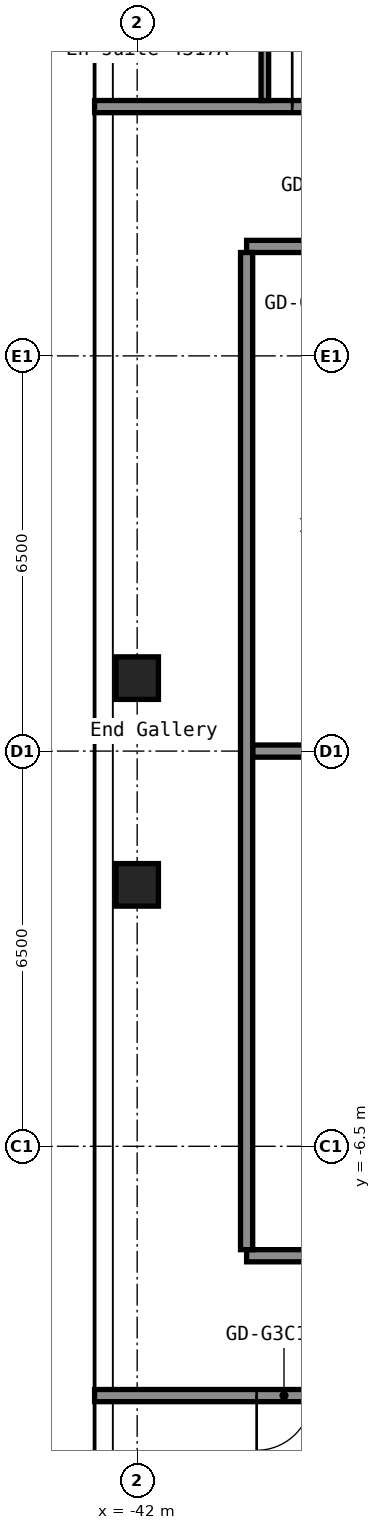
"""IFC4 building model, lengths in metres.
Left out: names, types, materials, properties, quantities, classifications, styles, units other than length and angle.
Written with IfcOpenShell. Run it as: python <this file> out.ifc"""

import sys

from ifc_helpers import new_model, si_unit, direction, frame, frame_2d, origin, origin_2d, place, context, subcontext, project, spatial, rectangle, hollow_rectangle, extrude, element, fill, save


model = new_model("IFC4")
c1 = context("Model", 3, precision=1e-05, world=origin(), true_north=direction((0.0, 1.0)))
c2 = subcontext(c1, "Body", "Model", "MODEL_VIEW")
j1 = project(units=[si_unit("LENGTHUNIT", "METRE"), si_unit("PLANEANGLEUNIT", "RADIAN")], contexts=[c1])
p1 = place(None, origin())
s1 = spatial("IfcSite", under=j1, at=p1, CompositionType="ELEMENT")
p2 = place(p1, origin())
s2 = spatial("IfcBuilding", under=s1, at=p2, CompositionType="ELEMENT")
p3 = place(p2, frame((0.0, 0.0, 153.4)))
s3 = spatial("IfcBuildingStorey", under=s2, at=p3, CompositionType="ELEMENT", Elevation=153.4)
for number, where, z_axis, x_axis in (
    (1, (-42.0, -2.2, 0.0), (0.0, 0.0, 1.0), (1.0, 0.0, 0.0)),
    (2, (-42.0, 1.2, 0.0), (0.0, 0.0, 1.0), (1.0, 0.0, 0.0)),
):
    element("IfcColumn", number, at=place(p3, frame(where, z_axis=z_axis, x_axis=x_axis)), inside=s3, PredefinedType="COLUMN", context=c2, shape_type="SweptSolid", body=[
        extrude(hollow_rectangle(XDim=0.7, YDim=0.7, WallThickness=0.028, at=origin_2d()), origin(), (0.0, 0.0, 1.0), 2.75),
    ])
p4 = place(p3, frame((-42.7, -10.6, 0.0), z_axis=(0.0, 0.0, 1.0), x_axis=(1.0, 0.0, 0.0)))
e3 = element("IfcWall", 3, at=p4, inside=s3, PredefinedType="PARTITIONING", context=c2, shape_type="SweptSolid", body=[
    extrude(rectangle(XDim=25.9, YDim=0.2, at=frame_2d((12.95, 0.0))), origin(), (0.0, 0.0, 1.0), 2.75),
])
p5 = place(p4, frame((2.665, 0.0, 0.0)))
e4 = element("IfcOpeningElement", 4, at=p5, cuts=e3, PredefinedType="OPENING", context=c2, shape_type="SweptSolid", body=[
    extrude(rectangle(XDim=0.9, YDim=2.1, at=frame_2d((0.45, 1.05))), frame((0.0, 0.11, 0.0), z_axis=(0.0, -1.0, 0.0), x_axis=(1.0, 0.0, 0.0)), (0.0, 0.0, 1.0), 0.22),
])
p6 = place(p4, frame((7.065, 0.0, 0.0)))
e5 = element("IfcOpeningElement", 5, at=p6, cuts=e3, PredefinedType="OPENING", context=c2, shape_type="SweptSolid", body=[
    extrude(rectangle(XDim=0.9, YDim=2.1, at=frame_2d((0.45, 1.05))), frame((0.0, 0.11, 0.0), z_axis=(0.0, -1.0, 0.0), x_axis=(1.0, 0.0, 0.0)), (0.0, 0.0, 1.0), 0.22),
])
p7 = place(p4, frame((11.255, 0.0, 0.0)))
e6 = element("IfcOpeningElement", 6, at=p7, cuts=e3, PredefinedType="OPENING", context=c2, shape_type="SweptSolid", body=[
    extrude(rectangle(XDim=0.9, YDim=2.1, at=frame_2d((0.45, 1.05))), frame((0.0, 0.11, 0.0), z_axis=(0.0, -1.0, 0.0), x_axis=(1.0, 0.0, 0.0)), (0.0, 0.0, 1.0), 0.22),
])
p8 = place(p4, frame((15.455, 0.0, 0.0)))
e7 = element("IfcOpeningElement", 7, at=p8, cuts=e3, PredefinedType="OPENING", context=c2, shape_type="SweptSolid", body=[
    extrude(rectangle(XDim=0.9, YDim=2.1, at=frame_2d((0.45, 1.05))), frame((0.0, 0.11, 0.0), z_axis=(0.0, -1.0, 0.0), x_axis=(1.0, 0.0, 0.0)), (0.0, 0.0, 1.0), 0.22),
])
p9 = place(p4, frame((21.2, 0.0, 0.0)))
e8 = element("IfcOpeningElement", 8, at=p9, cuts=e3, PredefinedType="OPENING", context=c2, shape_type="SweptSolid", body=[
    extrude(rectangle(XDim=1.0, YDim=2.1, at=frame_2d((0.5, 1.05))), frame((0.0, 0.11, 0.0), z_axis=(0.0, -1.0, 0.0), x_axis=(1.0, 0.0, 0.0)), (0.0, 0.0, 1.0), 0.22),
])
p10 = place(p3, frame((-40.2, -8.3, 0.0), z_axis=(0.0, 0.0, 1.0), x_axis=(1.0, 0.0, 0.0)))
e9 = element("IfcWall", 9, at=p10, inside=s3, PredefinedType="PARTITIONING", context=c2, shape_type="SweptSolid", body=[
    extrude(rectangle(XDim=6.6, YDim=0.2, at=frame_2d((3.3, 0.0))), origin(), (0.0, 0.0, 1.0), 2.75),
])
p11 = place(p10, frame((1.465, 0.0, 0.0)))
e10 = element("IfcOpeningElement", 10, at=p11, cuts=e9, PredefinedType="OPENING", context=c2, shape_type="SweptSolid", body=[
    extrude(rectangle(XDim=0.9, YDim=2.1, at=frame_2d((0.45, 1.05))), frame((0.0, 0.11, 0.0), z_axis=(0.0, -1.0, 0.0), x_axis=(1.0, 0.0, 0.0)), (0.0, 0.0, 1.0), 0.22),
])
p12 = place(p10, frame((4.765, 0.0, 0.0)))
e11 = element("IfcOpeningElement", 11, at=p12, cuts=e9, PredefinedType="OPENING", context=c2, shape_type="SweptSolid", body=[
    extrude(rectangle(XDim=0.9, YDim=2.1, at=frame_2d((0.45, 1.05))), frame((0.0, 0.11, 0.0), z_axis=(0.0, -1.0, 0.0), x_axis=(1.0, 0.0, 0.0)), (0.0, 0.0, 1.0), 0.22),
])
p13 = place(p3, frame((-40.1, 0.0, 0.0), z_axis=(0.0, 0.0, 1.0), x_axis=(1.0, 0.0, 0.0)))
e12 = element("IfcWall", 12, at=p13, inside=s3, PredefinedType="PARTITIONING", context=c2, shape_type="SweptSolid", body=[
    extrude(rectangle(XDim=6.5, YDim=0.2, at=frame_2d((3.25, 0.0))), origin(), (0.0, 0.0, 1.0), 2.75),
])
p14 = place(p3, frame((-40.2, 8.3, 0.0), z_axis=(0.0, 0.0, 1.0), x_axis=(1.0, 0.0, 0.0)))
e13 = element("IfcWall", 13, at=p14, inside=s3, PredefinedType="PARTITIONING", context=c2, shape_type="SweptSolid", body=[
    extrude(rectangle(XDim=6.6, YDim=0.2, at=frame_2d((3.3, 0.0))), origin(), (0.0, 0.0, 1.0), 2.75),
])
p15 = place(p14, frame((1.07, 0.0, 0.0)))
e14 = element("IfcOpeningElement", 14, at=p15, cuts=e13, PredefinedType="OPENING", context=c2, shape_type="SweptSolid", body=[
    extrude(rectangle(XDim=0.9, YDim=2.1, at=frame_2d((0.45, 1.05))), frame((0.0, 0.11, 0.0), z_axis=(0.0, -1.0, 0.0), x_axis=(1.0, 0.0, 0.0)), (0.0, 0.0, 1.0), 0.22),
])
p16 = place(p14, frame((4.37, 0.0, 0.0)))
e15 = element("IfcOpeningElement", 15, at=p16, cuts=e13, PredefinedType="OPENING", context=c2, shape_type="SweptSolid", body=[
    extrude(rectangle(XDim=0.9, YDim=2.1, at=frame_2d((0.45, 1.05))), frame((0.0, 0.11, 0.0), z_axis=(0.0, -1.0, 0.0), x_axis=(1.0, 0.0, 0.0)), (0.0, 0.0, 1.0), 0.22),
])
p17 = place(p3, frame((-42.7, 10.6, 0.0), z_axis=(0.0, 0.0, 1.0), x_axis=(1.0, 0.0, 0.0)))
e16 = element("IfcWall", 16, at=p17, inside=s3, PredefinedType="PARTITIONING", context=c2, shape_type="SweptSolid", body=[
    extrude(rectangle(XDim=25.9, YDim=0.2, at=frame_2d((12.95, 0.0))), origin(), (0.0, 0.0, 1.0), 2.75),
])
p18 = place(p17, frame((3.25, 0.0, 0.0)))
e17 = element("IfcOpeningElement", 17, at=p18, cuts=e16, PredefinedType="OPENING", context=c2, shape_type="SweptSolid", body=[
    extrude(rectangle(XDim=1.0, YDim=2.1, at=frame_2d((0.5, 1.05))), frame((0.0, 0.11, 0.0), z_axis=(0.0, -1.0, 0.0), x_axis=(1.0, 0.0, 0.0)), (0.0, 0.0, 1.0), 0.22),
])
p19 = place(p17, frame((5.15, 0.0, 0.0)))
e18 = element("IfcOpeningElement", 18, at=p19, cuts=e16, PredefinedType="OPENING", context=c2, shape_type="SweptSolid", body=[
    extrude(rectangle(XDim=1.0, YDim=2.1, at=frame_2d((0.5, 1.05))), frame((0.0, 0.11, 0.0), z_axis=(0.0, -1.0, 0.0), x_axis=(1.0, 0.0, 0.0)), (0.0, 0.0, 1.0), 0.22),
])
p20 = place(p17, frame((14.5, 0.0, 0.0)))
e19 = element("IfcOpeningElement", 19, at=p20, cuts=e16, PredefinedType="OPENING", context=c2, shape_type="SweptSolid", body=[
    extrude(rectangle(XDim=1.0, YDim=2.1, at=frame_2d((0.5, 1.05))), frame((0.0, 0.11, 0.0), z_axis=(0.0, -1.0, 0.0), x_axis=(1.0, 0.0, 0.0)), (0.0, 0.0, 1.0), 0.22),
])
p21 = place(p17, frame((20.35, 0.0, 0.0)))
e20 = element("IfcOpeningElement", 20, at=p21, cuts=e16, PredefinedType="OPENING", context=c2, shape_type="SweptSolid", body=[
    extrude(rectangle(XDim=1.0, YDim=2.1, at=frame_2d((0.5, 1.05))), frame((0.0, 0.11, 0.0), z_axis=(0.0, -1.0, 0.0), x_axis=(1.0, 0.0, 0.0)), (0.0, 0.0, 1.0), 0.22),
])
p22 = place(p17, frame((22.05, 0.0, 0.0)))
e21 = element("IfcOpeningElement", 21, at=p22, cuts=e16, PredefinedType="OPENING", context=c2, shape_type="SweptSolid", body=[
    extrude(rectangle(XDim=1.0, YDim=2.1, at=frame_2d((0.5, 1.05))), frame((0.0, 0.11, 0.0), z_axis=(0.0, -1.0, 0.0), x_axis=(1.0, 0.0, 0.0)), (0.0, 0.0, 1.0), 0.22),
])
p23 = place(p3, frame((-40.2, -8.2, 0.0), z_axis=(0.0, 0.0, 1.0), x_axis=(0.0, 1.0, 0.0)))
e22 = element("IfcWall", 22, at=p23, inside=s3, PredefinedType="PARTITIONING", context=c2, shape_type="SweptSolid", body=[
    extrude(rectangle(XDim=16.4, YDim=0.2, at=frame_2d((8.2, 0.0))), origin(), (0.0, 0.0, 1.0), 2.75),
])
p24 = place(p3, frame((-39.9, 10.7, 0.0), z_axis=(0.0, 0.0, 1.0), x_axis=(0.0, 1.0, 0.0)))
e23 = element("IfcWall", 23, at=p24, inside=s3, PredefinedType="PARTITIONING", context=c2, shape_type="SweptSolid", body=[
    extrude(rectangle(XDim=2.9, YDim=0.125, at=frame_2d((1.45, 0.0))), origin(), (0.0, 0.0, 1.0), 2.75),
])
p25 = place(p24, frame((1.5, 0.0, 0.0)))
e24 = element("IfcOpeningElement", 24, at=p25, cuts=e23, PredefinedType="OPENING", context=c2, shape_type="SweptSolid", body=[
    extrude(rectangle(XDim=0.8, YDim=2.1, at=frame_2d((0.4, 1.05))), frame((0.0, 0.073, 0.0), z_axis=(0.0, -1.0, 0.0), x_axis=(1.0, 0.0, 0.0)), (0.0, 0.0, 1.0), 0.145),
])
p26 = place(p5, origin())
e25 = element("IfcDoor", 25, at=p26, inside=s3, OperationType="SINGLE_SWING_LEFT", PredefinedType="DOOR", context=c2, shape_type="SweptSolid", body=[
    extrude(rectangle(XDim=0.9, YDim=2.1, at=frame_2d((0.45, 1.05))), frame((0.0, 0.025, 0.0), z_axis=(0.0, -1.0, 0.0), x_axis=(1.0, 0.0, 0.0)), (0.0, 0.0, 1.0), 0.05),
])
fill(e4, e25)
p27 = place(p18, origin())
e26 = element("IfcDoor", 26, at=p27, inside=s3, OperationType="SINGLE_SWING_RIGHT", PredefinedType="DOOR", context=c2, shape_type="SweptSolid", body=[
    extrude(rectangle(XDim=1.0, YDim=2.1, at=frame_2d((0.5, 1.05))), frame((0.0, 0.025, 0.0), z_axis=(0.0, -1.0, 0.0), x_axis=(1.0, 0.0, 0.0)), (0.0, 0.0, 1.0), 0.05),
])
fill(e17, e26)
save(model, sys.argv[1])
